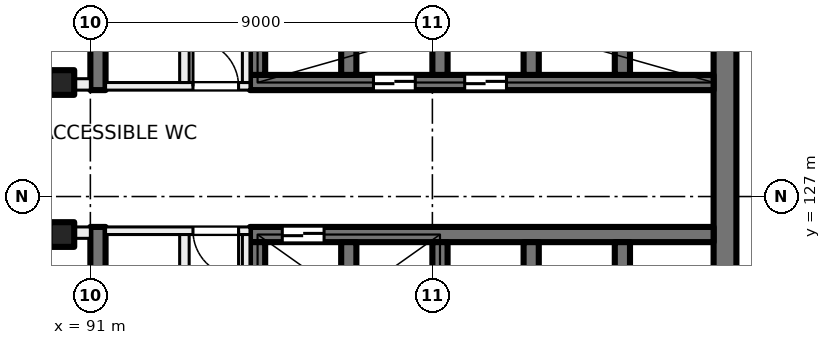
"""IFC4 building model, lengths in metres.
Left out: names, types, materials, properties, quantities, classifications, styles, units other than length and angle.
Written with IfcOpenShell. Run it as: python <this file> out.ifc"""

import sys

from ifc_helpers import new_model, si_unit, direction, frame, frame_2d, origin, origin_2d, place, context, subcontext, project, spatial, rectangle, extrude, element, fill, save


model = new_model("IFC4")
c1 = context("Model", 3, precision=1e-05, world=origin(), true_north=direction((0.0, 1.0)))
c2 = subcontext(c1, "Body", "Model", "MODEL_VIEW")
j1 = project(units=[si_unit("LENGTHUNIT", "METRE"), si_unit("PLANEANGLEUNIT", "RADIAN")], contexts=[c1])
p1 = place(None, origin())
s1 = spatial("IfcSite", under=j1, at=p1, CompositionType="ELEMENT")
p2 = place(p1, origin())
s2 = spatial("IfcBuilding", under=s1, at=p2, CompositionType="ELEMENT")
p3 = place(p2, frame((0.0, 0.0, 125.0)))
s3 = spatial("IfcBuildingStorey", under=s2, at=p3, CompositionType="ELEMENT", Elevation=125.0)
for number, where, z_axis, x_axis in (
    (1, (90.25, 130.0, 0.0), (0.0, 0.0, 1.0), (1.0, 0.0, 0.0)),
    (2, (90.25, 126.0, 0.0), (0.0, 0.0, 1.0), (1.0, 0.0, 0.0)),
):
    element("IfcColumn", number, at=place(p3, frame(where, z_axis=z_axis, x_axis=x_axis)), inside=s3, PredefinedType="COLUMN", context=c2, shape_type="SweptSolid", body=[
        extrude(rectangle(XDim=0.65, YDim=0.65, at=origin_2d()), origin(), (0.0, 0.0, 1.0), 4.0),
    ])
p4 = place(p3, frame((107.7, 135.2, 0.0), z_axis=(0.0, 0.0, 1.0), x_axis=(0.0, -1.0, 0.0)))
e3 = element("IfcWall", 3, at=p4, inside=s3, PredefinedType="SHEAR", context=c2, shape_type="SweptSolid", body=[
    extrude(rectangle(XDim=14.4, YDim=0.6, at=frame_2d((7.2, 0.0))), origin(), (0.0, 0.0, 1.0), 4.0),
])
p5 = place(p3, frame((107.4, 130.0, 0.0), z_axis=(0.0, 0.0, 1.0), x_axis=(-1.0, 0.0, 0.0)))
e4 = element("IfcWall", 4, at=p5, inside=s3, PredefinedType="SHEAR", context=c2, shape_type="SweptSolid", body=[
    extrude(rectangle(XDim=12.2, YDim=0.4, at=frame_2d((6.1, 0.0))), origin(), (0.0, 0.0, 1.0), 4.0),
])
p6 = place(p5, frame((5.45, 0.0, 0.0)))
e5 = element("IfcOpeningElement", 5, at=p6, cuts=e4, PredefinedType="OPENING", context=c2, shape_type="SweptSolid", body=[
    extrude(rectangle(XDim=1.1, YDim=2.1, at=frame_2d((0.55, 1.05))), frame((0.0, 0.21, 0.0), z_axis=(0.0, -1.0, 0.0), x_axis=(1.0, 0.0, 0.0)), (0.0, 0.0, 1.0), 0.42),
])
p7 = place(p5, frame((7.85, 0.0, 0.0)))
e6 = element("IfcOpeningElement", 6, at=p7, cuts=e4, PredefinedType="OPENING", context=c2, shape_type="SweptSolid", body=[
    extrude(rectangle(XDim=1.1, YDim=2.1, at=frame_2d((0.55, 1.05))), frame((0.0, 0.21, 0.0), z_axis=(0.0, -1.0, 0.0), x_axis=(1.0, 0.0, 0.0)), (0.0, 0.0, 1.0), 0.42),
])
for number, where, z_axis, x_axis in (
    (7, (105.0, 133.2, 0.0), (0.0, 0.0, 1.0), (0.0, -1.0, 0.0)),
    (8, (102.6, 133.2, 0.0), (0.0, 0.0, 1.0), (0.0, -1.0, 0.0)),
    (9, (100.2, 133.2, 0.0), (0.0, 0.0, 1.0), (0.0, -1.0, 0.0)),
    (10, (97.8, 133.2, 0.0), (0.0, 0.0, 1.0), (0.0, -1.0, 0.0)),
    (11, (95.4, 133.2, 0.0), (0.0, 0.0, 1.0), (0.0, -1.0, 0.0)),
):
    element("IfcWall", number, at=place(p3, frame(where, z_axis=z_axis, x_axis=x_axis)), inside=s3, PredefinedType="SHEAR", context=c2, shape_type="SweptSolid", body=[
        extrude(rectangle(XDim=3.0, YDim=0.4, at=frame_2d((1.5, 0.0))), origin(), (0.0, 0.0, 1.0), 4.0),
    ])
p8 = place(p3, frame((107.4, 126.0, 0.0), z_axis=(0.0, 0.0, 1.0), x_axis=(-1.0, 0.0, 0.0)))
e12 = element("IfcWall", 12, at=p8, inside=s3, PredefinedType="SHEAR", context=c2, shape_type="SweptSolid", body=[
    extrude(rectangle(XDim=12.2, YDim=0.4, at=frame_2d((6.1, 0.0))), origin(), (0.0, 0.0, 1.0), 4.0),
])
p9 = place(p8, frame((10.25, 0.0, 0.0)))
e13 = element("IfcOpeningElement", 13, at=p9, cuts=e12, PredefinedType="OPENING", context=c2, shape_type="SweptSolid", body=[
    extrude(rectangle(XDim=1.1, YDim=2.1, at=frame_2d((0.55, 1.05))), frame((0.0, 0.21, 0.0), z_axis=(0.0, -1.0, 0.0), x_axis=(1.0, 0.0, 0.0)), (0.0, 0.0, 1.0), 0.42),
])
for number, where, z_axis, x_axis in (
    (14, (105.0, 125.8, 0.0), (0.0, 0.0, 1.0), (0.0, -1.0, 0.0)),
    (15, (102.6, 125.8, 0.0), (0.0, 0.0, 1.0), (0.0, -1.0, 0.0)),
    (16, (100.2, 125.8, 0.0), (0.0, 0.0, 1.0), (0.0, -1.0, 0.0)),
    (17, (97.8, 125.8, 0.0), (0.0, 0.0, 1.0), (0.0, -1.0, 0.0)),
    (18, (95.4, 125.8, 0.0), (0.0, 0.0, 1.0), (0.0, -1.0, 0.0)),
):
    element("IfcWall", number, at=place(p3, frame(where, z_axis=z_axis, x_axis=x_axis)), inside=s3, PredefinedType="SHEAR", context=c2, shape_type="SweptSolid", body=[
        extrude(rectangle(XDim=3.0, YDim=0.4, at=frame_2d((1.5, 0.0))), origin(), (0.0, 0.0, 1.0), 4.0),
    ])
for number, where, z_axis, x_axis in (
    (19, (91.2, 138.4, 0.0), (0.0, 0.0, 1.0), (0.0, -1.0, 0.0)),
    (20, (91.2, 126.2, 0.0), (0.0, 0.0, 1.0), (0.0, -1.0, 0.0)),
):
    element("IfcWall", number, at=place(p3, frame(where, z_axis=z_axis, x_axis=x_axis)), inside=s3, PredefinedType="SHEAR", context=c2, shape_type="SweptSolid", body=[
        extrude(rectangle(XDim=8.6, YDim=0.4, at=frame_2d((4.3, 0.0))), origin(), (0.0, 0.0, 1.0), 4.0),
    ])
p10 = place(p3, frame((95.2, 126.1, 0.0), z_axis=(0.0, 0.0, 1.0), x_axis=(-1.0, 0.0, 0.0)))
e21 = element("IfcWall", 21, at=p10, inside=s3, PredefinedType="PARTITIONING", context=c2, shape_type="SweptSolid", body=[
    extrude(rectangle(XDim=3.8, YDim=0.2, at=frame_2d((1.9, 0.0))), origin(), (0.0, 0.0, 1.0), 3.625),
])
p11 = place(p10, frame((0.3, 0.0, 0.0)))
e22 = element("IfcOpeningElement", 22, at=p11, cuts=e21, PredefinedType="OPENING", context=c2, shape_type="SweptSolid", body=[
    extrude(rectangle(XDim=1.2, YDim=2.1, at=frame_2d((0.6, 1.05))), frame((0.0, 0.11, 0.0), z_axis=(0.0, -1.0, 0.0), x_axis=(1.0, 0.0, 0.0)), (0.0, 0.0, 1.0), 0.22),
])
p12 = place(p3, frame((95.1, 117.6, 0.0), z_axis=(0.0, 0.0, 1.0), x_axis=(0.0, 1.0, 0.0)))
e23 = element("IfcWall", 23, at=p12, inside=s3, PredefinedType="PARTITIONING", context=c2, shape_type="SweptSolid", body=[
    extrude(rectangle(XDim=8.4, YDim=0.2, at=frame_2d((4.2, 0.0))), origin(), (0.0, 0.0, 1.0), 3.625),
])
p13 = place(p12, frame((1.65, 0.0, 0.0)))
e24 = element("IfcOpeningElement", 24, at=p13, cuts=e23, PredefinedType="OPENING", context=c2, shape_type="SweptSolid", body=[
    extrude(rectangle(XDim=1.5, YDim=2.1, at=frame_2d((0.75, 1.05))), frame((0.0, 0.11, 0.0), z_axis=(0.0, -1.0, 0.0), x_axis=(1.0, 0.0, 0.0)), (0.0, 0.0, 1.0), 0.22),
])
p14 = place(p3, frame((93.475, 117.6, 0.0), z_axis=(0.0, 0.0, 1.0), x_axis=(0.0, 1.0, 0.0)))
e25 = element("IfcWall", 25, at=p14, inside=s3, PredefinedType="PARTITIONING", context=c2, shape_type="SweptSolid", body=[
    extrude(rectangle(XDim=8.4, YDim=0.25, at=frame_2d((4.2, 0.0))), origin(), (0.0, 0.0, 1.0), 3.625),
])
p15 = place(p14, frame((5.925, 0.0, 0.0)))
e26 = element("IfcOpeningElement", 26, at=p15, cuts=e25, PredefinedType="OPENING", context=c2, shape_type="SweptSolid", body=[
    extrude(rectangle(XDim=0.8, YDim=2.1, at=frame_2d((0.4, 1.05))), frame((0.0, 0.135, 0.0), z_axis=(0.0, -1.0, 0.0), x_axis=(1.0, 0.0, 0.0)), (0.0, 0.0, 1.0), 0.27),
])
p16 = place(p14, frame((1.675, 0.0, 0.0)))
e27 = element("IfcOpeningElement", 27, at=p16, cuts=e25, PredefinedType="OPENING", context=c2, shape_type="SweptSolid", body=[
    extrude(rectangle(XDim=0.8, YDim=2.1, at=frame_2d((0.4, 1.05))), frame((0.0, 0.135, 0.0), z_axis=(0.0, -1.0, 0.0), x_axis=(1.0, 0.0, 0.0)), (0.0, 0.0, 1.0), 0.27),
])
p17 = place(p3, frame((91.4, 129.9, 0.0), z_axis=(0.0, 0.0, 1.0), x_axis=(1.0, 0.0, 0.0)))
e28 = element("IfcWall", 28, at=p17, inside=s3, PredefinedType="PARTITIONING", context=c2, shape_type="SweptSolid", body=[
    extrude(rectangle(XDim=3.8, YDim=0.2, at=frame_2d((1.9, 0.0))), origin(), (0.0, 0.0, 1.0), 3.625),
])
p18 = place(p17, frame((2.3, 0.0, 0.0)))
e29 = element("IfcOpeningElement", 29, at=p18, cuts=e28, PredefinedType="OPENING", context=c2, shape_type="SweptSolid", body=[
    extrude(rectangle(XDim=1.2, YDim=2.1, at=frame_2d((0.6, 1.05))), frame((0.0, 0.11, 0.0), z_axis=(0.0, -1.0, 0.0), x_axis=(1.0, 0.0, 0.0)), (0.0, 0.0, 1.0), 0.22),
])
p19 = place(p3, frame((95.1, 130.0, 0.0), z_axis=(0.0, 0.0, 1.0), x_axis=(0.0, 1.0, 0.0)))
e30 = element("IfcWall", 30, at=p19, inside=s3, PredefinedType="PARTITIONING", context=c2, shape_type="SweptSolid", body=[
    extrude(rectangle(XDim=8.4, YDim=0.2, at=frame_2d((4.2, 0.0))), origin(), (0.0, 0.0, 1.0), 3.625),
])
p20 = place(p19, frame((5.25, 0.0, 0.0)))
e31 = element("IfcOpeningElement", 31, at=p20, cuts=e30, PredefinedType="OPENING", context=c2, shape_type="SweptSolid", body=[
    extrude(rectangle(XDim=1.5, YDim=2.1, at=frame_2d((0.75, 1.05))), frame((0.0, 0.11, 0.0), z_axis=(0.0, -1.0, 0.0), x_axis=(1.0, 0.0, 0.0)), (0.0, 0.0, 1.0), 0.22),
])
p21 = place(p3, frame((93.475, 130.0, 0.0), z_axis=(0.0, 0.0, 1.0), x_axis=(0.0, 1.0, 0.0)))
e32 = element("IfcWall", 32, at=p21, inside=s3, PredefinedType="PARTITIONING", context=c2, shape_type="SweptSolid", body=[
    extrude(rectangle(XDim=8.4, YDim=0.25, at=frame_2d((4.2, 0.0))), origin(), (0.0, 0.0, 1.0), 3.625),
])
p22 = place(p21, frame((3.8, 0.0, 0.0)))
e33 = element("IfcOpeningElement", 33, at=p22, cuts=e32, PredefinedType="OPENING", context=c2, shape_type="SweptSolid", body=[
    extrude(rectangle(XDim=0.8, YDim=2.1, at=frame_2d((0.4, 1.05))), frame((0.0, 0.135, 0.0), z_axis=(0.0, -1.0, 0.0), x_axis=(1.0, 0.0, 0.0)), (0.0, 0.0, 1.0), 0.27),
])
p23 = place(p3, frame((72.5, 129.95, 0.0), z_axis=(0.0, 0.0, 1.0), x_axis=(1.0, 0.0, 0.0)))
e34 = element("IfcWall", 34, at=p23, inside=s3, PredefinedType="PARTITIONING", context=c2, shape_type="SweptSolid", body=[
    extrude(rectangle(XDim=18.5, YDim=0.3, at=frame_2d((9.25, 0.0))), origin(), (0.0, 0.0, 1.0), 3.625),
])
p24 = place(p23, frame((11.5, 0.0, 0.0)))
e35 = element("IfcOpeningElement", 35, at=p24, cuts=e34, PredefinedType="OPENING", context=c2, shape_type="SweptSolid", body=[
    extrude(rectangle(XDim=1.0, YDim=2.1, at=frame_2d((0.5, 1.05))), frame((0.0, 0.16, 0.0), z_axis=(0.0, -1.0, 0.0), x_axis=(1.0, 0.0, 0.0)), (0.0, 0.0, 1.0), 0.32),
])
p25 = place(p23, frame((3.875, 0.0, 0.0)))
e36 = element("IfcOpeningElement", 36, at=p25, cuts=e34, PredefinedType="OPENING", context=c2, shape_type="SweptSolid", body=[
    extrude(rectangle(XDim=1.0, YDim=2.1, at=frame_2d((0.5, 1.05))), frame((0.0, 0.16, 0.0), z_axis=(0.0, -1.0, 0.0), x_axis=(1.0, 0.0, 0.0)), (0.0, 0.0, 1.0), 0.32),
])
p26 = place(p3, frame((91.0, 126.05, 0.0), z_axis=(0.0, 0.0, 1.0), x_axis=(-1.0, 0.0, 0.0)))
e37 = element("IfcWall", 37, at=p26, inside=s3, PredefinedType="PARTITIONING", context=c2, shape_type="SweptSolid", body=[
    extrude(rectangle(XDim=43.785, YDim=0.3, at=frame_2d((21.893, 0.0))), origin(), (0.0, 0.0, 1.0), 3.625),
])
p27 = place(p26, frame((2.025, 0.0, 0.0)))
e38 = element("IfcOpeningElement", 38, at=p27, cuts=e37, PredefinedType="OPENING", context=c2, shape_type="SweptSolid", body=[
    extrude(rectangle(XDim=1.2, YDim=2.1, at=frame_2d((0.6, 1.05))), frame((0.0, 0.16, 0.0), z_axis=(0.0, -1.0, 0.0), x_axis=(1.0, 0.0, 0.0)), (0.0, 0.0, 1.0), 0.32),
])
p28 = place(p26, frame((6.9, 0.0, 0.0)))
e39 = element("IfcOpeningElement", 39, at=p28, cuts=e37, PredefinedType="OPENING", context=c2, shape_type="SweptSolid", body=[
    extrude(rectangle(XDim=1.2, YDim=2.1, at=frame_2d((0.6, 1.05))), frame((0.0, 0.16, 0.0), z_axis=(0.0, -1.0, 0.0), x_axis=(1.0, 0.0, 0.0)), (0.0, 0.0, 1.0), 0.32),
])
p29 = place(p26, frame((11.4, 0.0, 0.0)))
e40 = element("IfcOpeningElement", 40, at=p29, cuts=e37, PredefinedType="OPENING", context=c2, shape_type="SweptSolid", body=[
    extrude(rectangle(XDim=1.2, YDim=2.1, at=frame_2d((0.6, 1.05))), frame((0.0, 0.16, 0.0), z_axis=(0.0, -1.0, 0.0), x_axis=(1.0, 0.0, 0.0)), (0.0, 0.0, 1.0), 0.32),
])
p30 = place(p26, frame((15.25, 0.0, 0.0)))
e41 = element("IfcOpeningElement", 41, at=p30, cuts=e37, PredefinedType="OPENING", context=c2, shape_type="SweptSolid", body=[
    extrude(rectangle(XDim=1.0, YDim=2.1, at=frame_2d((0.5, 1.05))), frame((0.0, 0.16, 0.0), z_axis=(0.0, -1.0, 0.0), x_axis=(1.0, 0.0, 0.0)), (0.0, 0.0, 1.0), 0.32),
])
p31 = place(p26, frame((19.9, 0.0, 0.0)))
e42 = element("IfcOpeningElement", 42, at=p31, cuts=e37, PredefinedType="OPENING", context=c2, shape_type="SweptSolid", body=[
    extrude(rectangle(XDim=1.2, YDim=2.1, at=frame_2d((0.6, 1.05))), frame((0.0, 0.16, 0.0), z_axis=(0.0, -1.0, 0.0), x_axis=(1.0, 0.0, 0.0)), (0.0, 0.0, 1.0), 0.32),
])
p32 = place(p26, frame((23.85, 0.0, 0.0)))
e43 = element("IfcOpeningElement", 43, at=p32, cuts=e37, PredefinedType="OPENING", context=c2, shape_type="SweptSolid", body=[
    extrude(rectangle(XDim=1.8, YDim=2.1, at=frame_2d((0.9, 1.05))), frame((0.0, 0.16, 0.0), z_axis=(0.0, -1.0, 0.0), x_axis=(1.0, 0.0, 0.0)), (0.0, 0.0, 1.0), 0.32),
])
p33 = place(p26, frame((34.0, 0.0, 0.0)))
e44 = element("IfcOpeningElement", 44, at=p33, cuts=e37, PredefinedType="OPENING", context=c2, shape_type="SweptSolid", body=[
    extrude(rectangle(XDim=1.0, YDim=2.1, at=frame_2d((0.5, 1.05))), frame((0.0, 0.16, 0.0), z_axis=(0.0, -1.0, 0.0), x_axis=(1.0, 0.0, 0.0)), (0.0, 0.0, 1.0), 0.32),
])
p34 = place(p26, frame((39.296, 0.0, 0.0)))
e45 = element("IfcOpeningElement", 45, at=p34, cuts=e37, PredefinedType="OPENING", context=c2, shape_type="SweptSolid", body=[
    extrude(rectangle(XDim=1.8, YDim=2.1, at=frame_2d((0.9, 1.05))), frame((0.0, 0.16, 0.0), z_axis=(0.0, -1.0, 0.0), x_axis=(1.0, 0.0, 0.0)), (0.0, 0.0, 1.0), 0.32),
])
p35 = place(p9, origin())
e46 = element("IfcDoor", 46, at=p35, inside=s3, OperationType="DOUBLE_DOOR_SLIDING", PredefinedType="DOOR", context=c2, shape_type="SweptSolid", body=[
    extrude(rectangle(XDim=1.1, YDim=2.1, at=frame_2d((0.55, 1.05))), frame((0.0, 0.025, 0.0), z_axis=(0.0, -1.0, 0.0), x_axis=(1.0, 0.0, 0.0)), (0.0, 0.0, 1.0), 0.05),
])
fill(e13, e46)
p36 = place(p6, origin())
e47 = element("IfcDoor", 47, at=p36, inside=s3, OperationType="DOUBLE_DOOR_SLIDING", PredefinedType="DOOR", context=c2, shape_type="SweptSolid", body=[
    extrude(rectangle(XDim=1.1, YDim=2.1, at=frame_2d((0.55, 1.05))), frame((0.0, 0.025, 0.0), z_axis=(0.0, -1.0, 0.0), x_axis=(1.0, 0.0, 0.0)), (0.0, 0.0, 1.0), 0.05),
])
fill(e5, e47)
p37 = place(p7, origin())
e48 = element("IfcDoor", 48, at=p37, inside=s3, OperationType="DOUBLE_DOOR_SLIDING", PredefinedType="DOOR", context=c2, shape_type="SweptSolid", body=[
    extrude(rectangle(XDim=1.1, YDim=2.1, at=frame_2d((0.55, 1.05))), frame((0.0, 0.025, 0.0), z_axis=(0.0, -1.0, 0.0), x_axis=(1.0, 0.0, 0.0)), (0.0, 0.0, 1.0), 0.05),
])
fill(e6, e48)
p38 = place(p11, origin())
e49 = element("IfcDoor", 49, at=p38, inside=s3, OperationType="DOUBLE_DOOR_SINGLE_SWING", PredefinedType="DOOR", context=c2, shape_type="SweptSolid", body=[
    extrude(rectangle(XDim=1.2, YDim=2.1, at=frame_2d((0.6, 1.05))), frame((0.0, 0.025, 0.0), z_axis=(0.0, -1.0, 0.0), x_axis=(1.0, 0.0, 0.0)), (0.0, 0.0, 1.0), 0.05),
])
fill(e22, e49)
p39 = place(p18, origin())
e50 = element("IfcDoor", 50, at=p39, inside=s3, OperationType="DOUBLE_DOOR_SINGLE_SWING", PredefinedType="DOOR", context=c2, shape_type="SweptSolid", body=[
    extrude(rectangle(XDim=1.2, YDim=2.1, at=frame_2d((0.6, 1.05))), frame((0.0, 0.025, 0.0), z_axis=(0.0, -1.0, 0.0), x_axis=(1.0, 0.0, 0.0)), (0.0, 0.0, 1.0), 0.05),
])
fill(e29, e50)
save(model, sys.argv[1])
